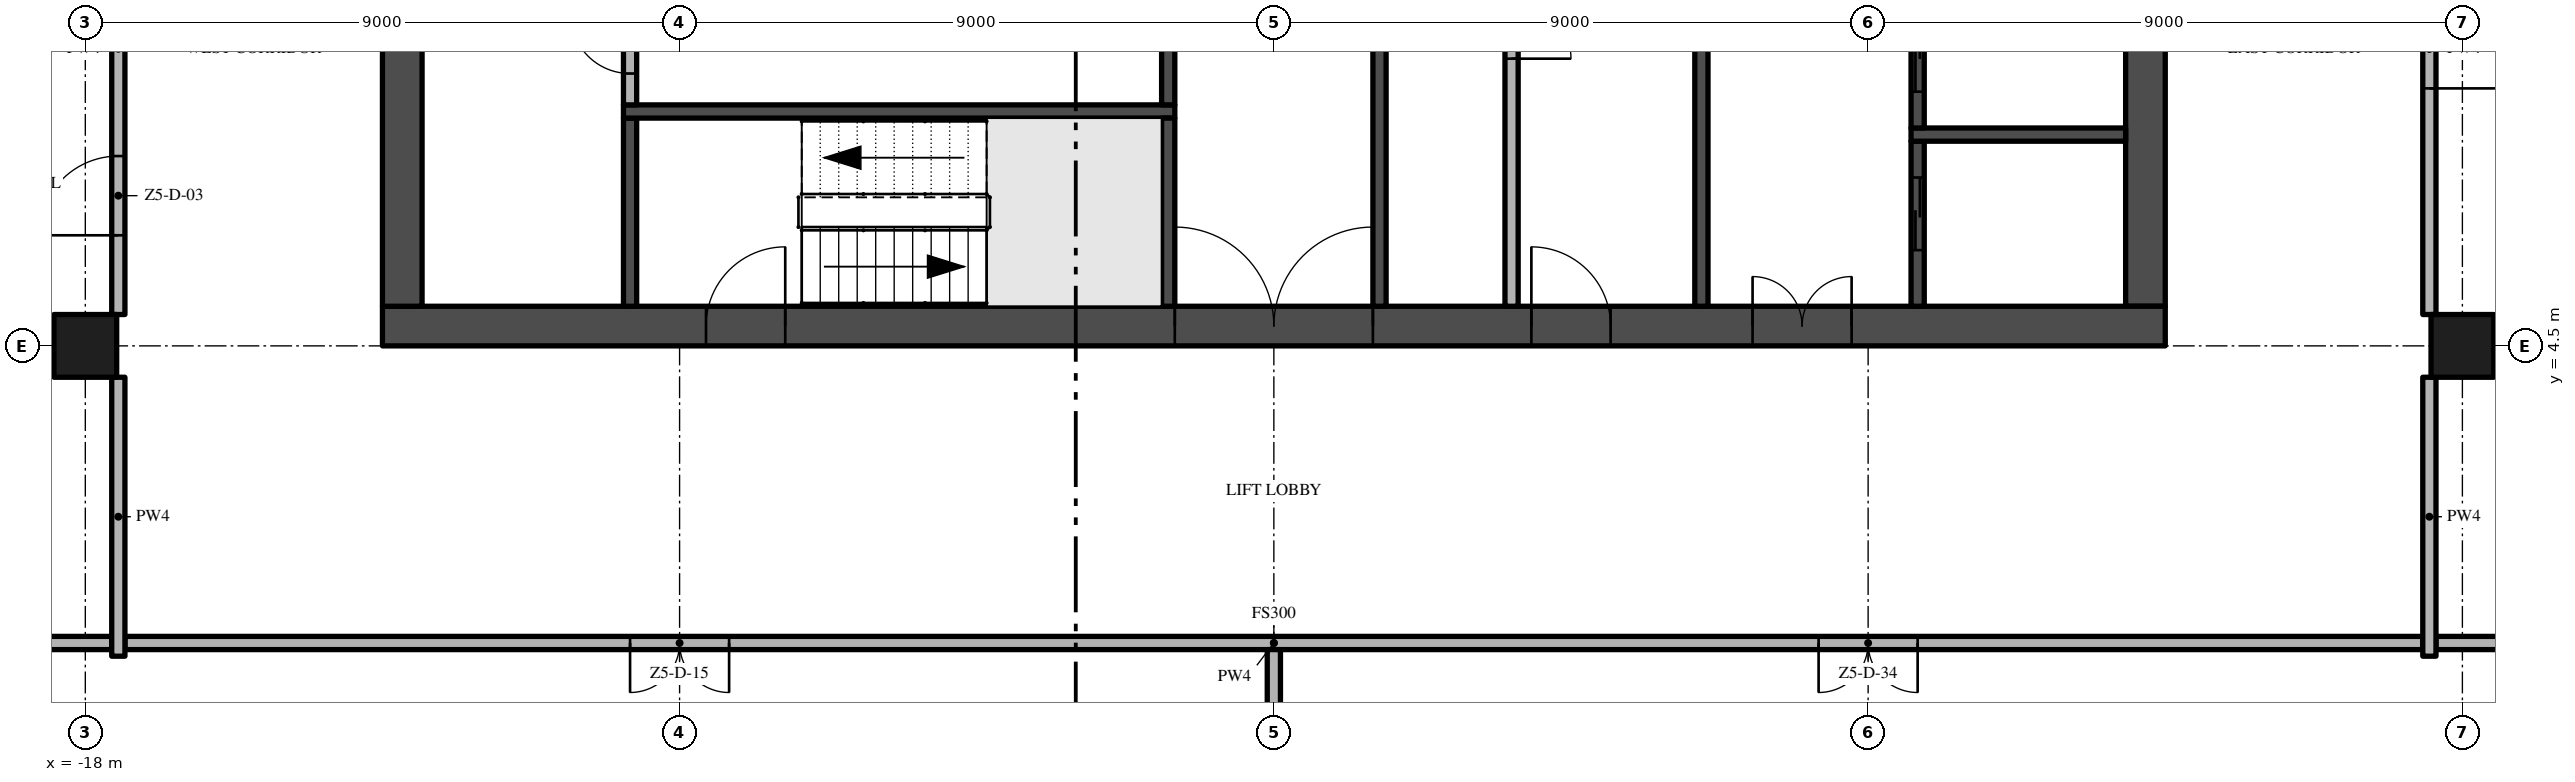
"""IFC4 building model, lengths in metres.
Left out: names, types, materials, properties, quantities, classifications, styles, units other than length and angle.
Written with IfcOpenShell. Run it as: python <this file> out.ifc"""

import sys

from ifc_helpers import new_model, si_unit, direction, frame, frame_2d, origin, origin_2d, place, context, subcontext, project, spatial, rectangle, extrude, element, fill, save


model = new_model("IFC4")
c1 = context("Model", 3, precision=1e-05, world=origin(), true_north=direction((0.0, 1.0)))
c2 = subcontext(c1, "Body", "Model", "MODEL_VIEW")
j1 = project(units=[si_unit("LENGTHUNIT", "METRE"), si_unit("PLANEANGLEUNIT", "RADIAN")], contexts=[c1])
p1 = place(None, origin())
s1 = spatial("IfcSite", under=j1, at=p1, CompositionType="ELEMENT")
p2 = place(p1, origin())
s2 = spatial("IfcBuilding", under=s1, at=p2, CompositionType="ELEMENT")
p3 = place(p2, frame((0.0, 0.0, 273.0)))
s3 = spatial("IfcBuildingStorey", under=s2, at=p3, CompositionType="ELEMENT", Elevation=273.0)
p4 = place(p3, frame((-13.5, 4.8, -0.3), z_axis=(0.0, 0.0, 1.0), x_axis=(1.0, 0.0, 0.0)))
e1 = element("IfcWall", 1, at=p4, inside=s3, PredefinedType="SHEAR", context=c2, shape_type="SweptSolid", body=[
    extrude(rectangle(XDim=27.0, YDim=0.6, at=frame_2d((13.5, 0.0))), origin(), (0.0, 0.0, 1.0), 3.8),
])
p5 = place(p4, frame((12.0, 0.0, 0.3)))
e2 = element("IfcOpeningElement", 2, at=p5, cuts=e1, PredefinedType="OPENING", context=c2, shape_type="SweptSolid", body=[
    extrude(rectangle(XDim=3.0, YDim=2.4, at=frame_2d((1.5, 1.2))), frame((0.0, 0.31, 0.0), z_axis=(0.0, -1.0, 0.0), x_axis=(1.0, 0.0, 0.0)), (0.0, 0.0, 1.0), 0.62),
])
p6 = place(p4, frame((4.9, 0.0, 0.3)))
e3 = element("IfcOpeningElement", 3, at=p6, cuts=e1, PredefinedType="OPENING", context=c2, shape_type="SweptSolid", body=[
    extrude(rectangle(XDim=1.2, YDim=2.2, at=frame_2d((0.6, 1.1))), frame((0.0, 0.31, 0.0), z_axis=(0.0, -1.0, 0.0), x_axis=(1.0, 0.0, 0.0)), (0.0, 0.0, 1.0), 0.62),
])
p7 = place(p4, frame((20.75, 0.0, 0.3)))
e4 = element("IfcOpeningElement", 4, at=p7, cuts=e1, PredefinedType="OPENING", context=c2, shape_type="SweptSolid", body=[
    extrude(rectangle(XDim=1.5, YDim=2.2, at=frame_2d((0.75, 1.1))), frame((0.0, 0.31, 0.0), z_axis=(0.0, -1.0, 0.0), x_axis=(1.0, 0.0, 0.0)), (0.0, 0.0, 1.0), 0.62),
])
p8 = place(p4, frame((17.4, 0.0, 0.3)))
e5 = element("IfcOpeningElement", 5, at=p8, cuts=e1, PredefinedType="OPENING", context=c2, shape_type="SweptSolid", body=[
    extrude(rectangle(XDim=1.2, YDim=2.2, at=frame_2d((0.6, 1.1))), frame((0.0, 0.31, 0.0), z_axis=(0.0, -1.0, 0.0), x_axis=(1.0, 0.0, 0.0)), (0.0, 0.0, 1.0), 0.62),
])
p9 = place(p3, frame((13.2, 5.1, -0.3), z_axis=(0.0, 0.0, 1.0), x_axis=(0.0, 1.0, 0.0)))
e6 = element("IfcWall", 6, at=p9, inside=s3, PredefinedType="SHEAR", context=c2, shape_type="SweptSolid", body=[
    extrude(rectangle(XDim=16.8, YDim=0.6, at=frame_2d((8.4, 0.0))), origin(), (0.0, 0.0, 1.0), 3.8),
])
p10 = place(p9, frame((6.3, 0.0, 0.3)))
e7 = element("IfcOpeningElement", 7, at=p10, cuts=e6, PredefinedType="OPENING", context=c2, shape_type="SweptSolid", body=[
    extrude(rectangle(XDim=1.2, YDim=2.2, at=frame_2d((0.6, 1.1))), frame((0.0, 0.31, 0.0), z_axis=(0.0, -1.0, 0.0), x_axis=(1.0, 0.0, 0.0)), (0.0, 0.0, 1.0), 0.62),
])
p11 = place(p3, frame((-13.2, 21.9, -0.3), z_axis=(0.0, 0.0, 1.0), x_axis=(0.0, -1.0, 0.0)))
e8 = element("IfcWall", 8, at=p11, inside=s3, PredefinedType="SHEAR", context=c2, shape_type="SweptSolid", body=[
    extrude(rectangle(XDim=16.8, YDim=0.6, at=frame_2d((8.4, 0.0))), origin(), (0.0, 0.0, 1.0), 3.8),
])
p12 = place(p11, frame((9.3, 0.0, 0.3)))
e9 = element("IfcOpeningElement", 9, at=p12, cuts=e8, PredefinedType="OPENING", context=c2, shape_type="SweptSolid", body=[
    extrude(rectangle(XDim=1.2, YDim=2.2, at=frame_2d((0.6, 1.1))), frame((0.0, 0.31, 0.0), z_axis=(0.0, -1.0, 0.0), x_axis=(1.0, 0.0, 0.0)), (0.0, 0.0, 1.0), 0.62),
])
for number, where, z_axis, x_axis in (
    (10, (-18.0, 4.5, 0.0), (0.0, 0.0, 1.0), (1.0, 0.0, 0.0)),
    (11, (18.0, 4.5, 0.0), (0.0, 0.0, 1.0), (1.0, 0.0, 0.0)),
):
    element("IfcColumn", number, at=place(p3, frame(where, z_axis=z_axis, x_axis=x_axis)), inside=s3, PredefinedType="COLUMN", context=c2, shape_type="SweptSolid", body=[
        extrude(rectangle(XDim=0.95, YDim=0.95, at=origin_2d()), origin(), (0.0, 0.0, 1.0), 3.5),
    ])
p13 = place(p3, frame((-9.75, 5.1, 0.0), z_axis=(0.0, 0.0, 1.0), x_axis=(0.0, 1.0, 0.0)))
e12 = element("IfcWall", 12, at=p13, inside=s3, PredefinedType="SHEAR", context=c2, shape_type="SweptSolid", body=[
    extrude(rectangle(XDim=2.85, YDim=0.2, at=frame_2d((1.425, 0.0))), origin(), (0.0, 0.0, 1.0), 3.5),
])
p14 = place(p3, frame((-9.85, 8.05, 0.0), z_axis=(0.0, 0.0, 1.0), x_axis=(1.0, 0.0, 0.0)))
e13 = element("IfcWall", 13, at=p14, inside=s3, PredefinedType="SHEAR", context=c2, shape_type="SweptSolid", body=[
    extrude(rectangle(XDim=8.35, YDim=0.2, at=frame_2d((4.175, 0.0))), origin(), (0.0, 0.0, 1.0), 3.5),
])
p15 = place(p3, frame((-9.75, 8.15, 0.0), z_axis=(0.0, 0.0, 1.0), x_axis=(0.0, 1.0, 0.0)))
e14 = element("IfcWall", 14, at=p15, inside=s3, PredefinedType="PARTITIONING", context=c2, shape_type="SweptSolid", body=[
    extrude(rectangle(XDim=1.85, YDim=0.2, at=frame_2d((0.925, 0.0))), origin(), (0.0, 0.0, 1.0), 3.5),
])
p16 = place(p15, frame((0.475, 0.0, 0.0)))
e15 = element("IfcOpeningElement", 15, at=p16, cuts=e14, PredefinedType="OPENING", context=c2, shape_type="SweptSolid", body=[
    extrude(rectangle(XDim=0.9, YDim=2.1, at=frame_2d((0.45, 1.05))), frame((0.0, 0.11, 0.0), z_axis=(0.0, -1.0, 0.0), x_axis=(1.0, 0.0, 0.0)), (0.0, 0.0, 1.0), 0.22),
])
p17 = place(p3, frame((-1.6, 5.1, 0.0), z_axis=(0.0, 0.0, 1.0), x_axis=(0.0, 1.0, 0.0)))
e16 = element("IfcWall", 16, at=p17, inside=s3, PredefinedType="SHEAR", context=c2, shape_type="SweptSolid", body=[
    extrude(rectangle(XDim=2.85, YDim=0.2, at=frame_2d((1.425, 0.0))), origin(), (0.0, 0.0, 1.0), 3.5),
])
p18 = place(p3, frame((-1.6, 8.15, 0.0), z_axis=(0.0, 0.0, 1.0), x_axis=(0.0, 1.0, 0.0)))
e17 = element("IfcWall", 17, at=p18, inside=s3, PredefinedType="SHEAR", context=c2, shape_type="SweptSolid", body=[
    extrude(rectangle(XDim=5.35, YDim=0.2, at=frame_2d((2.675, 0.0))), origin(), (0.0, 0.0, 1.0), 3.5),
])
p19 = place(p18, frame((2.225, 0.0, 0.0)))
e18 = element("IfcOpeningElement", 18, at=p19, cuts=e17, PredefinedType="OPENING", context=c2, shape_type="SweptSolid", body=[
    extrude(rectangle(XDim=0.9, YDim=2.1, at=frame_2d((0.45, 1.05))), frame((0.0, 0.11, 0.0), z_axis=(0.0, -1.0, 0.0), x_axis=(1.0, 0.0, 0.0)), (0.0, 0.0, 1.0), 0.22),
])
p20 = place(p3, frame((1.6, 13.5, 0.0), z_axis=(0.0, 0.0, 1.0), x_axis=(0.0, -1.0, 0.0)))
e19 = element("IfcWall", 19, at=p20, inside=s3, PredefinedType="SHEAR", context=c2, shape_type="SweptSolid", body=[
    extrude(rectangle(XDim=8.4, YDim=0.2, at=frame_2d((4.2, 0.0))), origin(), (0.0, 0.0, 1.0), 3.5),
])
p21 = place(p20, frame((3.35, 0.0, 0.0)))
e20 = element("IfcOpeningElement", 20, at=p21, cuts=e19, PredefinedType="OPENING", context=c2, shape_type="SweptSolid", body=[
    extrude(rectangle(XDim=0.9, YDim=2.1, at=frame_2d((0.45, 1.05))), frame((0.0, 0.11, 0.0), z_axis=(0.0, -1.0, 0.0), x_axis=(1.0, 0.0, 0.0)), (0.0, 0.0, 1.0), 0.22),
])
p22 = place(p3, frame((3.6, 13.5, 0.0), z_axis=(0.0, 0.0, 1.0), x_axis=(0.0, -1.0, 0.0)))
e21 = element("IfcWall", 21, at=p22, inside=s3, PredefinedType="PARTITIONING", context=c2, shape_type="SweptSolid", body=[
    extrude(rectangle(XDim=8.4, YDim=0.2, at=frame_2d((4.2, 0.0))), origin(), (0.0, 0.0, 1.0), 3.5),
])
p23 = place(p22, frame((3.75, 0.0, 0.0)))
e22 = element("IfcOpeningElement", 22, at=p23, cuts=e21, PredefinedType="OPENING", context=c2, shape_type="SweptSolid", body=[
    extrude(rectangle(XDim=0.9, YDim=2.1, at=frame_2d((0.45, 1.05))), frame((0.0, 0.11, 0.0), z_axis=(0.0, -1.0, 0.0), x_axis=(1.0, 0.0, 0.0)), (0.0, 0.0, 1.0), 0.22),
])
p24 = place(p3, frame((6.475, 5.1, 0.0), z_axis=(0.0, 0.0, 1.0), x_axis=(0.0, 1.0, 0.0)))
e23 = element("IfcWall", 23, at=p24, inside=s3, PredefinedType="SHEAR", context=c2, shape_type="SweptSolid", body=[
    extrude(rectangle(XDim=7.0, YDim=0.2, at=frame_2d((3.5, 0.0))), origin(), (0.0, 0.0, 1.0), 3.5),
])
p25 = place(p3, frame((9.75, 5.1, 0.0), z_axis=(0.0, 0.0, 1.0), x_axis=(0.0, 1.0, 0.0)))
e24 = element("IfcWall", 24, at=p25, inside=s3, PredefinedType="SHEAR", context=c2, shape_type="SweptSolid", body=[
    extrude(rectangle(XDim=2.5, YDim=0.2, at=frame_2d((1.25, 0.0))), origin(), (0.0, 0.0, 1.0), 3.5),
])
p26 = place(p25, frame((0.85, 0.0, 0.0)))
e25 = element("IfcOpeningElement", 25, at=p26, cuts=e24, PredefinedType="OPENING", context=c2, shape_type="SweptSolid", body=[
    extrude(rectangle(XDim=1.1, YDim=2.1, at=frame_2d((0.55, 1.05))), frame((0.0, 0.11, 0.0), z_axis=(0.0, -1.0, 0.0), x_axis=(1.0, 0.0, 0.0)), (0.0, 0.0, 1.0), 0.22),
])
p27 = place(p3, frame((9.65, 7.7, 0.0), z_axis=(0.0, 0.0, 1.0), x_axis=(1.0, 0.0, 0.0)))
e26 = element("IfcWall", 26, at=p27, inside=s3, PredefinedType="SHEAR", context=c2, shape_type="SweptSolid", body=[
    extrude(rectangle(XDim=3.25, YDim=0.2, at=frame_2d((1.625, 0.0))), origin(), (0.0, 0.0, 1.0), 3.5),
])
p28 = place(p3, frame((9.75, 7.8, 0.0), z_axis=(0.0, 0.0, 1.0), x_axis=(0.0, 1.0, 0.0)))
e27 = element("IfcWall", 27, at=p28, inside=s3, PredefinedType="SHEAR", context=c2, shape_type="SweptSolid", body=[
    extrude(rectangle(XDim=2.2, YDim=0.2, at=frame_2d((1.1, 0.0))), origin(), (0.0, 0.0, 1.0), 3.5),
])
p29 = place(p28, frame((0.55, 0.0, 0.0)))
e28 = element("IfcOpeningElement", 28, at=p29, cuts=e27, PredefinedType="OPENING", context=c2, shape_type="SweptSolid", body=[
    extrude(rectangle(XDim=1.1, YDim=2.1, at=frame_2d((0.55, 1.05))), frame((0.0, 0.11, 0.0), z_axis=(0.0, -1.0, 0.0), x_axis=(1.0, 0.0, 0.0)), (0.0, 0.0, 1.0), 0.22),
])
p30 = place(p3, frame((17.4, 0.0, 0.0), z_axis=(0.0, 0.0, 1.0), x_axis=(-1.0, 0.0, 0.0)))
e29 = element("IfcWall", 29, at=p30, inside=s3, PredefinedType="PARTITIONING", context=c2, shape_type="SweptSolid", body=[
    extrude(rectangle(XDim=34.8, YDim=0.2, at=frame_2d((17.4, 0.0))), origin(), (0.0, 0.0, 1.0), 3.5),
])
p31 = place(p30, frame((25.65, 0.0, 0.0)))
e30 = element("IfcOpeningElement", 30, at=p31, cuts=e29, PredefinedType="OPENING", context=c2, shape_type="SweptSolid", body=[
    extrude(rectangle(XDim=1.5, YDim=2.4, at=frame_2d((0.75, 1.2))), frame((0.0, 0.11, 0.0), z_axis=(0.0, -1.0, 0.0), x_axis=(1.0, 0.0, 0.0)), (0.0, 0.0, 1.0), 0.22),
])
p32 = place(p30, frame((7.65, 0.0, 0.0)))
e31 = element("IfcOpeningElement", 31, at=p32, cuts=e29, PredefinedType="OPENING", context=c2, shape_type="SweptSolid", body=[
    extrude(rectangle(XDim=1.5, YDim=2.4, at=frame_2d((0.75, 1.2))), frame((0.0, 0.11, 0.0), z_axis=(0.0, -1.0, 0.0), x_axis=(1.0, 0.0, 0.0)), (0.0, 0.0, 1.0), 0.22),
])
for number, where, z_axis, x_axis in (
    (32, (-26.7, 0.0, 0.0), (0.0, 0.0, 1.0), (1.0, 0.0, 0.0)),
    (33, (17.6, 0.0, 0.0), (0.0, 0.0, 1.0), (1.0, 0.0, 0.0)),
):
    element("IfcWall", number, at=place(p3, frame(where, z_axis=z_axis, x_axis=x_axis)), inside=s3, PredefinedType="PARTITIONING", context=c2, shape_type="SweptSolid", body=[
        extrude(rectangle(XDim=9.1, YDim=0.2, at=frame_2d((4.55, 0.0))), origin(), (0.0, 0.0, 1.0), 3.5),
    ])
p33 = place(p3, frame((-17.5, -0.2, 0.0), z_axis=(0.0, 0.0, 1.0), x_axis=(0.0, 1.0, 0.0)))
e34 = element("IfcWall", 34, at=p33, inside=s3, PredefinedType="PARTITIONING", context=c2, shape_type="SweptSolid", body=[
    extrude(rectangle(XDim=4.225, YDim=0.2, at=frame_2d((2.112, 0.0))), origin(), (0.0, 0.0, 1.0), 3.5),
])
p34 = place(p3, frame((-17.5, 4.975, 0.0), z_axis=(0.0, 0.0, 1.0), x_axis=(0.0, 1.0, 0.0)))
e35 = element("IfcWall", 35, at=p34, inside=s3, PredefinedType="PARTITIONING", context=c2, shape_type="SweptSolid", body=[
    extrude(rectangle(XDim=8.05, YDim=0.2, at=frame_2d((4.025, 0.0))), origin(), (0.0, 0.0, 1.0), 3.5),
])
p35 = place(p34, frame((1.2, 0.0, 0.0)))
e36 = element("IfcOpeningElement", 36, at=p35, cuts=e35, PredefinedType="OPENING", context=c2, shape_type="SweptSolid", body=[
    extrude(rectangle(XDim=1.2, YDim=2.4, at=frame_2d((0.6, 1.2))), frame((0.0, 0.11, 0.0), z_axis=(0.0, -1.0, 0.0), x_axis=(1.0, 0.0, 0.0)), (0.0, 0.0, 1.0), 0.22),
])
p36 = place(p3, frame((0.0, -4.025, 0.0), z_axis=(0.0, 0.0, 1.0), x_axis=(0.0, 1.0, 0.0)))
e37 = element("IfcWall", 37, at=p36, inside=s3, PredefinedType="PARTITIONING", context=c2, shape_type="SweptSolid", body=[
    extrude(rectangle(XDim=3.925, YDim=0.2, at=frame_2d((1.962, 0.0))), origin(), (0.0, 0.0, 1.0), 3.5),
])
p37 = place(p3, frame((17.5, -0.2, 0.0), z_axis=(0.0, 0.0, 1.0), x_axis=(0.0, 1.0, 0.0)))
e38 = element("IfcWall", 38, at=p37, inside=s3, PredefinedType="PARTITIONING", context=c2, shape_type="SweptSolid", body=[
    extrude(rectangle(XDim=4.225, YDim=0.2, at=frame_2d((2.112, 0.0))), origin(), (0.0, 0.0, 1.0), 3.5),
])
p38 = place(p3, frame((17.5, 13.025, 0.0), z_axis=(0.0, 0.0, 1.0), x_axis=(0.0, -1.0, 0.0)))
e39 = element("IfcWall", 39, at=p38, inside=s3, PredefinedType="PARTITIONING", context=c2, shape_type="SweptSolid", body=[
    extrude(rectangle(XDim=8.05, YDim=0.2, at=frame_2d((4.025, 0.0))), origin(), (0.0, 0.0, 1.0), 3.5),
])
p39 = place(p38, frame((3.425, 0.0, 0.0)))
e40 = element("IfcOpeningElement", 40, at=p39, cuts=e39, PredefinedType="OPENING", context=c2, shape_type="SweptSolid", body=[
    extrude(rectangle(XDim=1.2, YDim=2.4, at=frame_2d((0.6, 1.2))), frame((0.0, 0.11, 0.0), z_axis=(0.0, -1.0, 0.0), x_axis=(1.0, 0.0, 0.0)), (0.0, 0.0, 1.0), 0.22),
])
p40 = place(p5, frame((3.0, 0.0, 0.0), z_axis=(0.0, 0.0, 1.0), x_axis=(-1.0, 0.0, 0.0)))
e41 = element("IfcDoor", 41, at=p40, inside=s3, OperationType="DOUBLE_DOOR_SINGLE_SWING", PredefinedType="DOOR", context=c2, shape_type="SweptSolid", body=[
    extrude(rectangle(XDim=3.0, YDim=2.4, at=frame_2d((1.5, 1.2))), frame((0.0, 0.025, 0.0), z_axis=(0.0, -1.0, 0.0), x_axis=(1.0, 0.0, 0.0)), (0.0, 0.0, 1.0), 0.05),
])
fill(e2, e41)
p41 = place(p6, frame((1.2, 0.0, 0.0), z_axis=(0.0, 0.0, 1.0), x_axis=(-1.0, 0.0, 0.0)))
e42 = element("IfcDoor", 42, at=p41, inside=s3, OperationType="SINGLE_SWING_LEFT", PredefinedType="DOOR", context=c2, shape_type="SweptSolid", body=[
    extrude(rectangle(XDim=1.2, YDim=2.2, at=frame_2d((0.6, 1.1))), frame((0.0, 0.025, 0.0), z_axis=(0.0, -1.0, 0.0), x_axis=(1.0, 0.0, 0.0)), (0.0, 0.0, 1.0), 0.05),
])
fill(e3, e42)
p42 = place(p7, frame((1.5, 0.0, 0.0), z_axis=(0.0, 0.0, 1.0), x_axis=(-1.0, 0.0, 0.0)))
e43 = element("IfcDoor", 43, at=p42, inside=s3, OperationType="DOUBLE_DOOR_SINGLE_SWING", PredefinedType="DOOR", context=c2, shape_type="SweptSolid", body=[
    extrude(rectangle(XDim=1.5, YDim=2.2, at=frame_2d((0.75, 1.1))), frame((0.0, 0.025, 0.0), z_axis=(0.0, -1.0, 0.0), x_axis=(1.0, 0.0, 0.0)), (0.0, 0.0, 1.0), 0.05),
])
fill(e4, e43)
p43 = place(p8, frame((1.2, 0.0, 0.0), z_axis=(0.0, 0.0, 1.0), x_axis=(-1.0, 0.0, 0.0)))
e44 = element("IfcDoor", 44, at=p43, inside=s3, OperationType="SINGLE_SWING_RIGHT", PredefinedType="DOOR", context=c2, shape_type="SweptSolid", body=[
    extrude(rectangle(XDim=1.2, YDim=2.2, at=frame_2d((0.6, 1.1))), frame((0.0, 0.025, 0.0), z_axis=(0.0, -1.0, 0.0), x_axis=(1.0, 0.0, 0.0)), (0.0, 0.0, 1.0), 0.05),
])
fill(e5, e44)
p44 = place(p26, origin())
e45 = element("IfcDoor", 45, at=p44, inside=s3, OperationType="SLIDING_TO_RIGHT", PredefinedType="DOOR", context=c2, shape_type="SweptSolid", body=[
    extrude(rectangle(XDim=1.1, YDim=2.1, at=frame_2d((0.55, 1.05))), frame((0.0, 0.025, 0.0), z_axis=(0.0, -1.0, 0.0), x_axis=(1.0, 0.0, 0.0)), (0.0, 0.0, 1.0), 0.05),
])
fill(e25, e45)
p45 = place(p29, origin())
e46 = element("IfcDoor", 46, at=p45, inside=s3, OperationType="SLIDING_TO_RIGHT", PredefinedType="DOOR", context=c2, shape_type="SweptSolid", body=[
    extrude(rectangle(XDim=1.1, YDim=2.1, at=frame_2d((0.55, 1.05))), frame((0.0, 0.025, 0.0), z_axis=(0.0, -1.0, 0.0), x_axis=(1.0, 0.0, 0.0)), (0.0, 0.0, 1.0), 0.05),
])
fill(e28, e46)
p46 = place(p16, origin())
e47 = element("IfcDoor", 47, at=p46, inside=s3, OperationType="SINGLE_SWING_RIGHT", PredefinedType="DOOR", context=c2, shape_type="SweptSolid", body=[
    extrude(rectangle(XDim=0.9, YDim=2.1, at=frame_2d((0.45, 1.05))), frame((0.0, 0.025, 0.0), z_axis=(0.0, -1.0, 0.0), x_axis=(1.0, 0.0, 0.0)), (0.0, 0.0, 1.0), 0.05),
])
fill(e15, e47)
p47 = place(p23, origin())
e48 = element("IfcDoor", 48, at=p47, inside=s3, OperationType="SINGLE_SWING_RIGHT", PredefinedType="DOOR", context=c2, shape_type="SweptSolid", body=[
    extrude(rectangle(XDim=0.9, YDim=2.1, at=frame_2d((0.45, 1.05))), frame((0.0, 0.025, 0.0), z_axis=(0.0, -1.0, 0.0), x_axis=(1.0, 0.0, 0.0)), (0.0, 0.0, 1.0), 0.05),
])
fill(e22, e48)
p48 = place(p35, origin())
e49 = element("IfcDoor", 49, at=p48, inside=s3, OperationType="SINGLE_SWING_LEFT", PredefinedType="DOOR", context=c2, shape_type="SweptSolid", body=[
    extrude(rectangle(XDim=1.2, YDim=2.4, at=frame_2d((0.6, 1.2))), frame((0.0, 0.025, 0.0), z_axis=(0.0, -1.0, 0.0), x_axis=(1.0, 0.0, 0.0)), (0.0, 0.0, 1.0), 0.05),
])
fill(e36, e49)
p49 = place(p39, origin())
e50 = element("IfcDoor", 50, at=p49, inside=s3, OperationType="SINGLE_SWING_RIGHT", PredefinedType="DOOR", context=c2, shape_type="SweptSolid", body=[
    extrude(rectangle(XDim=1.2, YDim=2.4, at=frame_2d((0.6, 1.2))), frame((0.0, 0.025, 0.0), z_axis=(0.0, -1.0, 0.0), x_axis=(1.0, 0.0, 0.0)), (0.0, 0.0, 1.0), 0.05),
])
fill(e40, e50)
p50 = place(p31, origin())
e51 = element("IfcDoor", 51, at=p50, inside=s3, OperationType="DOUBLE_DOOR_SINGLE_SWING", PredefinedType="DOOR", context=c2, shape_type="SweptSolid", body=[
    extrude(rectangle(XDim=1.5, YDim=2.4, at=frame_2d((0.75, 1.2))), frame((0.0, 0.025, 0.0), z_axis=(0.0, -1.0, 0.0), x_axis=(1.0, 0.0, 0.0)), (0.0, 0.0, 1.0), 0.05),
])
fill(e30, e51)
p51 = place(p32, origin())
e52 = element("IfcDoor", 52, at=p51, inside=s3, OperationType="DOUBLE_DOOR_SINGLE_SWING", PredefinedType="DOOR", context=c2, shape_type="SweptSolid", body=[
    extrude(rectangle(XDim=1.5, YDim=2.4, at=frame_2d((0.75, 1.2))), frame((0.0, 0.025, 0.0), z_axis=(0.0, -1.0, 0.0), x_axis=(1.0, 0.0, 0.0)), (0.0, 0.0, 1.0), 0.05),
])
fill(e31, e52)
save(model, sys.argv[1])
